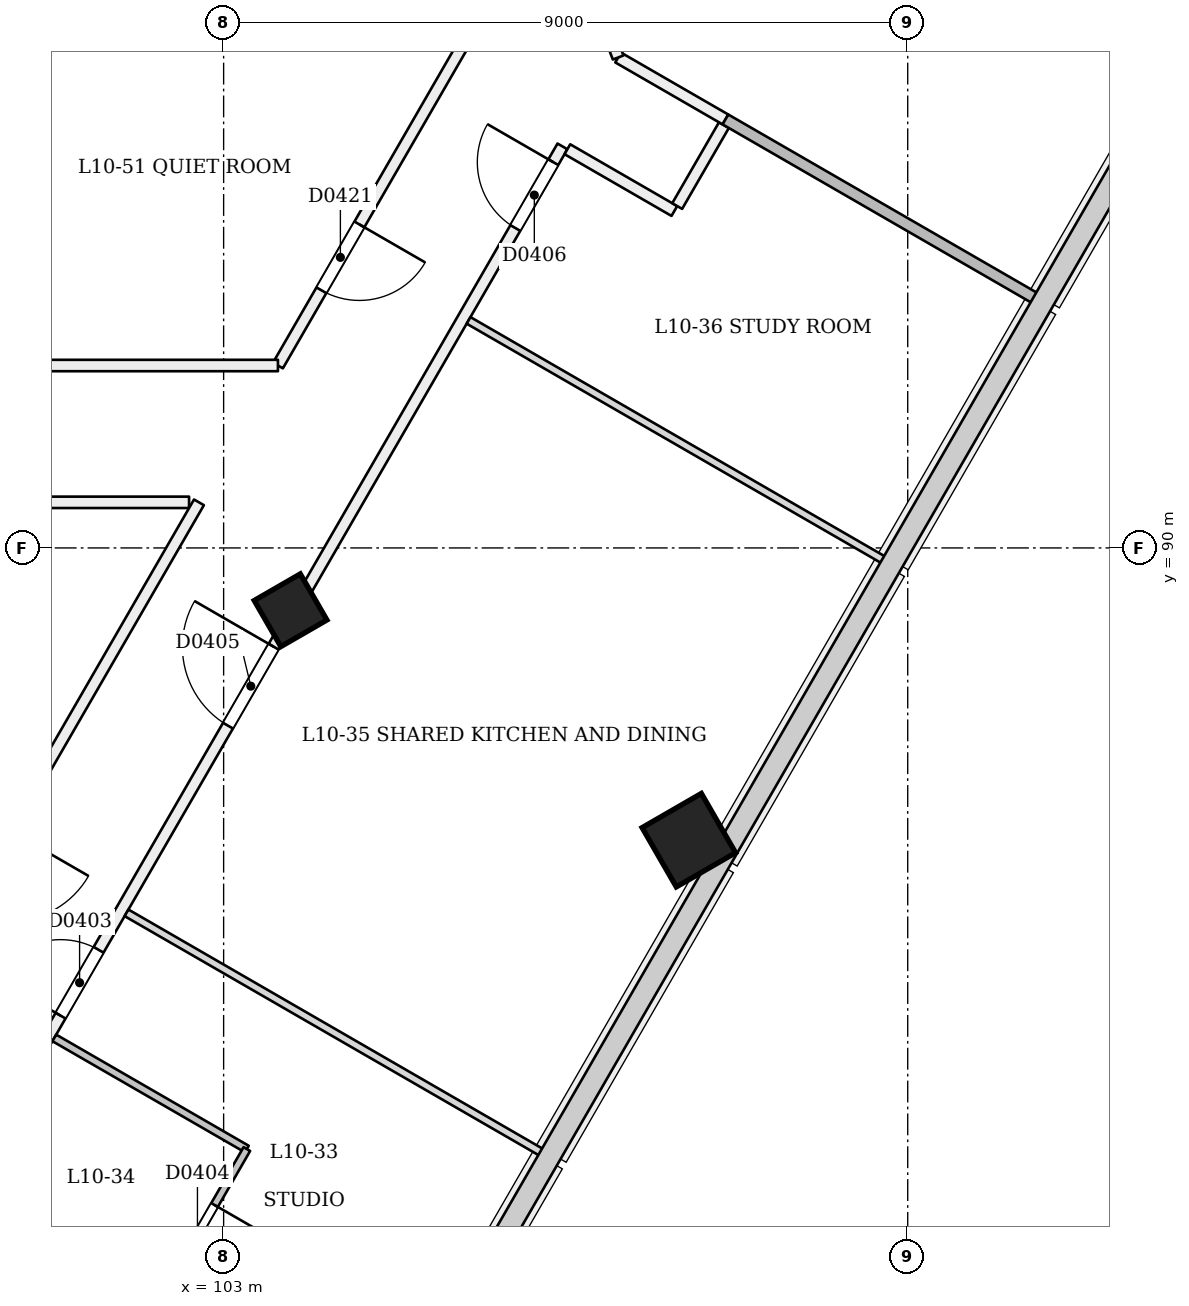
"""IFC4 building model, lengths in metres.
Left out: names, types, materials, properties, quantities, classifications, styles, units other than length and angle.
Written with IfcOpenShell. Run it as: python <this file> out.ifc"""

import sys

from ifc_helpers import new_model, si_unit, direction, frame, frame_2d, origin, origin_2d, place, context, subcontext, project, spatial, rectangle, extrude, element, fill, save


model = new_model("IFC4")
c1 = context("Model", 3, precision=1e-05, world=origin(), true_north=direction((0.0, 1.0)))
c2 = subcontext(c1, "Body", "Model", "MODEL_VIEW")
j1 = project(units=[si_unit("LENGTHUNIT", "METRE"), si_unit("PLANEANGLEUNIT", "RADIAN")], contexts=[c1])
p1 = place(None, origin())
s1 = spatial("IfcSite", under=j1, at=p1, CompositionType="ELEMENT")
p2 = place(p1, origin())
s2 = spatial("IfcBuilding", under=s1, at=p2, CompositionType="ELEMENT")
p3 = place(p2, frame((0.0, 0.0, 45.0)))
s3 = spatial("IfcBuildingStorey", under=s2, at=p3, CompositionType="ELEMENT", Elevation=45.0)
p4 = place(p3, frame((103.908, 89.133, -0.021), z_axis=(-0.022221406801, 0.038413224561, 0.999014831351), x_axis=(-0.499514905797, -0.86602108808, 0.022188598117)))
e1 = element("IfcColumn", 1, at=p4, inside=s3, PredefinedType="COLUMN", context=c2, shape_type="SweptSolid", body=[
    extrude(rectangle(XDim=0.7, YDim=0.7, at=origin_2d()), origin(), (0.0, 0.0, 1.0), 3.604),
])
p5 = place(p3, frame((109.147, 86.108, -0.027), z_axis=(-0.02222134892, 0.038480872521, 0.999012229206), x_axis=(-0.500176541907, -0.865638373249, 0.022217868592)))
e2 = element("IfcColumn", 2, at=p5, inside=s3, PredefinedType="COLUMN", context=c2, shape_type="SweptSolid", body=[
    extrude(rectangle(XDim=0.9, YDim=0.9, at=origin_2d()), origin(), (0.0, 0.0, 1.0), 3.604),
])
p6 = place(p3, frame((89.157, 63.586, 0.0), z_axis=(0.0, 0.0, 1.0), x_axis=(0.500000960059, 0.866024849493, 0.0)))
e3 = element("IfcWall", 3, at=p6, inside=s3, PredefinedType="PARTITIONING", context=c2, shape_type="SweptSolid", body=[
    extrude(rectangle(XDim=36.6, YDim=0.15, at=frame_2d((18.3, 0.0))), origin(), (0.0, 0.0, 1.0), 2.7),
])
p7 = place(p6, frame((5.395, 0.0, 0.0)))
e4 = element("IfcOpeningElement", 4, at=p7, cuts=e3, PredefinedType="OPENING", context=c2, shape_type="SweptSolid", body=[
    extrude(rectangle(XDim=1.0, YDim=2.1, at=frame_2d((0.5, 1.05))), frame((0.0, 0.085, 0.0), z_axis=(0.0, -1.0, 0.0), x_axis=(1.0, 0.0, 0.0)), (0.0, 0.0, 1.0), 0.171),
])
p8 = place(p6, frame((7.605, 0.0, 0.0)))
e5 = element("IfcOpeningElement", 5, at=p8, cuts=e3, PredefinedType="OPENING", context=c2, shape_type="SweptSolid", body=[
    extrude(rectangle(XDim=1.0, YDim=2.1, at=frame_2d((0.5, 1.05))), frame((0.0, 0.085, 0.0), z_axis=(0.0, -1.0, 0.0), x_axis=(1.0, 0.0, 0.0)), (0.0, 0.0, 1.0), 0.171),
])
p9 = place(p6, frame((13.25, 0.0, 0.0)))
e6 = element("IfcOpeningElement", 6, at=p9, cuts=e3, PredefinedType="OPENING", context=c2, shape_type="SweptSolid", body=[
    extrude(rectangle(XDim=1.0, YDim=2.1, at=frame_2d((0.5, 1.05))), frame((0.0, 0.085, 0.0), z_axis=(0.0, -1.0, 0.0), x_axis=(1.0, 0.0, 0.0)), (0.0, 0.0, 1.0), 0.171),
])
p10 = place(p6, frame((16.605, 0.0, 0.0)))
e7 = element("IfcOpeningElement", 7, at=p10, cuts=e3, PredefinedType="OPENING", context=c2, shape_type="SweptSolid", body=[
    extrude(rectangle(XDim=1.0, YDim=2.1, at=frame_2d((0.5, 1.05))), frame((0.0, 0.085, 0.0), z_axis=(0.0, -1.0, 0.0), x_axis=(1.0, 0.0, 0.0)), (0.0, 0.0, 1.0), 0.171),
])
p11 = place(p6, frame((23.395, 0.0, 0.0)))
e8 = element("IfcOpeningElement", 8, at=p11, cuts=e3, PredefinedType="OPENING", context=c2, shape_type="SweptSolid", body=[
    extrude(rectangle(XDim=1.0, YDim=2.1, at=frame_2d((0.5, 1.05))), frame((0.0, 0.085, 0.0), z_axis=(0.0, -1.0, 0.0), x_axis=(1.0, 0.0, 0.0)), (0.0, 0.0, 1.0), 0.171),
])
p12 = place(p6, frame((27.8, 0.0, 0.0)))
e9 = element("IfcOpeningElement", 9, at=p12, cuts=e3, PredefinedType="OPENING", context=c2, shape_type="SweptSolid", body=[
    extrude(rectangle(XDim=1.2, YDim=2.1, at=frame_2d((0.6, 1.05))), frame((0.0, 0.085, 0.0), z_axis=(0.0, -1.0, 0.0), x_axis=(1.0, 0.0, 0.0)), (0.0, 0.0, 1.0), 0.171),
])
p13 = place(p6, frame((35.36, 0.0, 0.0)))
e10 = element("IfcOpeningElement", 10, at=p13, cuts=e3, PredefinedType="OPENING", context=c2, shape_type="SweptSolid", body=[
    extrude(rectangle(XDim=1.0, YDim=2.1, at=frame_2d((0.5, 1.05))), frame((0.0, 0.085, 0.0), z_axis=(0.0, -1.0, 0.0), x_axis=(1.0, 0.0, 0.0)), (0.0, 0.0, 1.0), 0.171),
])
p14 = place(p3, frame((107.522, 95.245, 0.0), z_axis=(0.0, 0.0, 1.0), x_axis=(0.866015446554, -0.500017246033, 0.0)))
e11 = element("IfcWall", 11, at=p14, inside=s3, PredefinedType="PARTITIONING", context=c2, shape_type="SweptSolid", body=[
    extrude(rectangle(XDim=1.625, YDim=0.15, at=frame_2d((0.812, 0.0))), origin(), (0.0, 0.0, 1.0), 3.1),
])
p15 = place(p3, frame((108.967, 94.498, 0.0), z_axis=(0.0, 0.0, 1.0), x_axis=(0.499963176624, 0.866046662726, 0.0)))
e12 = element("IfcWall", 12, at=p15, inside=s3, PredefinedType="PARTITIONING", context=c2, shape_type="SweptSolid", body=[
    extrude(rectangle(XDim=1.229, YDim=0.15, at=frame_2d((0.615, 0.0))), origin(), (0.0, 0.0, 1.0), 3.1),
])
p16 = place(p3, frame((109.602, 95.637, 0.0), z_axis=(0.0, 0.0, 1.0), x_axis=(-0.86604092097, 0.499973122483, 0.0)))
e13 = element("IfcWall", 13, at=p16, inside=s3, PredefinedType="PARTITIONING", context=c2, shape_type="SweptSolid", body=[
    extrude(rectangle(XDim=1.63, YDim=0.15, at=frame_2d((0.815, 0.0))), origin(), (0.0, 0.0, 1.0), 3.1),
])
p17 = place(p3, frame((108.19, 96.452, 0.0), z_axis=(0.0, 0.0, 1.0), x_axis=(-0.354044281385, 0.935228660178, 0.0)))
e14 = element("IfcWall", 14, at=p17, inside=s3, PredefinedType="PARTITIONING", context=c2, shape_type="SweptSolid", body=[
    extrude(rectangle(XDim=1.062, YDim=0.15, at=frame_2d((0.531, 0.0))), origin(), (0.0, 0.0, 1.0), 3.1),
])
p18 = place(p3, frame((88.051, 90.6, 0.0), z_axis=(0.0, 0.0, 1.0), x_axis=(1.0, 0.0, 0.0)))
e15 = element("IfcWall", 15, at=p18, inside=s3, PredefinedType="PARTITIONING", context=c2, shape_type="SweptSolid", body=[
    extrude(rectangle(XDim=14.494, YDim=0.15, at=frame_2d((7.247, 0.0))), origin(), (0.0, 0.0, 1.0), 3.1),
])
p19 = place(p18, frame((1.483, 0.0, 0.0)))
e16 = element("IfcOpeningElement", 16, at=p19, cuts=e15, PredefinedType="OPENING", context=c2, shape_type="SweptSolid", body=[
    extrude(rectangle(XDim=1.2, YDim=2.1, at=frame_2d((0.6, 1.05))), frame((0.0, 0.085, 0.0), z_axis=(0.0, -1.0, 0.0), x_axis=(1.0, 0.0, 0.0)), (0.0, 0.0, 1.0), 0.171),
])
p20 = place(p3, frame((102.675, 90.6, 0.0), z_axis=(0.0, 0.0, 1.0), x_axis=(-0.499997865474, -0.86602663615, 0.0)))
e17 = element("IfcWall", 17, at=p20, inside=s3, PredefinedType="PARTITIONING", context=c2, shape_type="SweptSolid", body=[
    extrude(rectangle(XDim=35.221, YDim=0.15, at=frame_2d((17.61, 0.0))), origin(), (0.0, 0.0, 1.0), 3.1),
])
p21 = place(p20, frame((12.875, 0.0, 0.0)))
e18 = element("IfcOpeningElement", 18, at=p21, cuts=e17, PredefinedType="OPENING", context=c2, shape_type="SweptSolid", body=[
    extrude(rectangle(XDim=1.2, YDim=2.1, at=frame_2d((0.6, 1.05))), frame((0.0, 0.085, 0.0), z_axis=(0.0, -1.0, 0.0), x_axis=(1.0, 0.0, 0.0)), (0.0, 0.0, 1.0), 0.171),
])
p22 = place(p20, frame((4.983, 0.0, 0.0)))
e19 = element("IfcOpeningElement", 19, at=p22, cuts=e17, PredefinedType="OPENING", context=c2, shape_type="SweptSolid", body=[
    extrude(rectangle(XDim=1.2, YDim=2.1, at=frame_2d((0.6, 1.05))), frame((0.0, 0.085, 0.0), z_axis=(0.0, -1.0, 0.0), x_axis=(1.0, 0.0, 0.0)), (0.0, 0.0, 1.0), 0.171),
])
p23 = place(p20, frame((21.048, 0.0, 0.0)))
e20 = element("IfcOpeningElement", 20, at=p23, cuts=e17, PredefinedType="OPENING", context=c2, shape_type="SweptSolid", body=[
    extrude(rectangle(XDim=1.0, YDim=2.1, at=frame_2d((0.5, 1.05))), frame((0.0, 0.085, 0.0), z_axis=(0.0, -1.0, 0.0), x_axis=(1.0, 0.0, 0.0)), (0.0, 0.0, 1.0), 0.171),
])
p24 = place(p3, frame((106.182, 96.673, 0.0), z_axis=(0.0, 0.0, 1.0), x_axis=(-0.499986575203, -0.866033154456, 0.0)))
e21 = element("IfcWall", 21, at=p24, inside=s3, PredefinedType="PARTITIONING", context=c2, shape_type="SweptSolid", body=[
    extrude(rectangle(XDim=4.934, YDim=0.15, at=frame_2d((2.467, 0.0))), origin(), (0.0, 0.0, 1.0), 3.1),
])
p25 = place(p24, frame((2.791, 0.0, 0.0)))
e22 = element("IfcOpeningElement", 22, at=p25, cuts=e21, PredefinedType="OPENING", context=c2, shape_type="SweptSolid", body=[
    extrude(rectangle(XDim=1.0, YDim=2.1, at=frame_2d((0.5, 1.05))), frame((0.0, 0.085, 0.0), z_axis=(0.0, -1.0, 0.0), x_axis=(1.0, 0.0, 0.0)), (0.0, 0.0, 1.0), 0.171),
])
p26 = place(p3, frame((103.715, 92.4, 0.0), z_axis=(0.0, 0.0, 1.0), x_axis=(-1.0, 0.0, 0.0)))
e23 = element("IfcWall", 23, at=p26, inside=s3, PredefinedType="PARTITIONING", context=c2, shape_type="SweptSolid", body=[
    extrude(rectangle(XDim=3.84, YDim=0.15, at=frame_2d((1.92, 0.0))), origin(), (0.0, 0.0, 1.0), 3.1),
])
p27 = place(p3, frame((101.962, 79.865, 0.0), z_axis=(0.0, 0.0, 1.0), x_axis=(-0.866018712932, 0.500011588718, 0.0)))
e24 = element("IfcWall", 24, at=p27, inside=s3, PredefinedType="PARTITIONING", context=c2, shape_type="SweptSolid", body=[
    extrude(rectangle(XDim=2.875, YDim=0.1, at=frame_2d((1.438, 0.0))), origin(), (0.0, 0.0, 1.0), 2.7),
])
p28 = place(p3, frame((100.772, 83.554, 0.0), z_axis=(0.0, 0.0, 1.0), x_axis=(0.866025730634, -0.499999433879, 0.0)))
e25 = element("IfcWall", 25, at=p28, inside=s3, PredefinedType="PARTITIONING", context=c2, shape_type="SweptSolid", body=[
    extrude(rectangle(XDim=2.925, YDim=0.1, at=frame_2d((1.462, 0.0))), origin(), (0.0, 0.0, 1.0), 3.1),
])
p29 = place(p3, frame((103.305, 82.092, 0.0), z_axis=(0.0, 0.0, 1.0), x_axis=(-0.499971721724, -0.866041729639, 0.0)))
e26 = element("IfcWall", 26, at=p29, inside=s3, PredefinedType="PARTITIONING", context=c2, shape_type="SweptSolid", body=[
    extrude(rectangle(XDim=5.2, YDim=0.1, at=frame_2d((2.6, 0.0))), origin(), (0.0, 0.0, 1.0), 2.7),
])
p30 = place(p29, frame((3.45, 0.0, 0.0)))
e27 = element("IfcOpeningElement", 27, at=p30, cuts=e26, PredefinedType="OPENING", context=c2, shape_type="SweptSolid", body=[
    extrude(rectangle(XDim=0.9, YDim=2.1, at=frame_2d((0.45, 1.05))), frame((0.0, 0.061, 0.0), z_axis=(0.0, -1.0, 0.0), x_axis=(1.0, 0.0, 0.0)), (0.0, 0.0, 1.0), 0.121),
])
p31 = place(p29, frame((0.85, 0.0, 0.0)))
e28 = element("IfcOpeningElement", 28, at=p31, cuts=e26, PredefinedType="OPENING", context=c2, shape_type="SweptSolid", body=[
    extrude(rectangle(XDim=0.9, YDim=2.1, at=frame_2d((0.45, 1.05))), frame((0.0, 0.061, 0.0), z_axis=(0.0, -1.0, 0.0), x_axis=(1.0, 0.0, 0.0)), (0.0, 0.0, 1.0), 0.121),
])
for number, where, z_axis, x_axis in (
    (29, (107.218, 82.027, 0.0), (0.0, 0.0, 1.0), (-0.866, 0.5, 0.0)),
    (30, (111.718, 89.821, 0.0), (0.0, 0.0, 1.0), (-0.866, 0.5, 0.0)),
):
    element("IfcWall", number, at=place(p3, frame(where, z_axis=z_axis, x_axis=x_axis)), inside=s3, PredefinedType="PARTITIONING", context=c2, shape_type="SweptSolid", body=[
        extrude(rectangle(XDim=6.345, YDim=0.1, at=frame_2d((3.173, 0.0))), origin(), (0.0, 0.0, 1.0), 2.6),
    ])
p32 = place(p3, frame((113.707, 93.267, 0.0), z_axis=(0.0, 0.0, 1.0), x_axis=(-0.866028632512, 0.499994407638, 0.0)))
e31 = element("IfcWall", 31, at=p32, inside=s3, PredefinedType="PARTITIONING", context=c2, shape_type="SweptSolid", body=[
    extrude(rectangle(XDim=4.74, YDim=0.15, at=frame_2d((2.37, 0.0))), origin(), (0.0, 0.0, 1.0), 2.6),
])
p33 = place(p11, origin())
e32 = element("IfcDoor", 32, at=p33, inside=s3, OperationType="SINGLE_SWING_LEFT", PredefinedType="NOTDEFINED", context=c2, shape_type="SweptSolid", body=[
    extrude(rectangle(XDim=1.0, YDim=2.1, at=frame_2d((0.5, 1.05))), frame((0.0, 0.025, 0.0), z_axis=(0.0, -1.0, 0.0), x_axis=(1.0, 0.0, 0.0)), (0.0, 0.0, 1.0), 0.05),
])
fill(e8, e32)
p34 = place(p31, origin())
e33 = element("IfcDoor", 33, at=p34, inside=s3, OperationType="SINGLE_SWING_LEFT", PredefinedType="NOTDEFINED", context=c2, shape_type="SweptSolid", body=[
    extrude(rectangle(XDim=0.9, YDim=2.1, at=frame_2d((0.45, 1.05))), frame((0.0, 0.025, 0.0), z_axis=(0.0, -1.0, 0.0), x_axis=(1.0, 0.0, 0.0)), (0.0, 0.0, 1.0), 0.05),
])
fill(e28, e33)
p35 = place(p12, origin())
e34 = element("IfcDoor", 34, at=p35, inside=s3, OperationType="SINGLE_SWING_RIGHT", PredefinedType="NOTDEFINED", context=c2, shape_type="SweptSolid", body=[
    extrude(rectangle(XDim=1.2, YDim=2.1, at=frame_2d((0.6, 1.05))), frame((0.0, 0.025, 0.0), z_axis=(0.0, -1.0, 0.0), x_axis=(1.0, 0.0, 0.0)), (0.0, 0.0, 1.0), 0.05),
])
fill(e9, e34)
p36 = place(p13, origin())
e35 = element("IfcDoor", 35, at=p36, inside=s3, OperationType="SINGLE_SWING_RIGHT", PredefinedType="NOTDEFINED", context=c2, shape_type="SweptSolid", body=[
    extrude(rectangle(XDim=1.0, YDim=2.1, at=frame_2d((0.5, 1.05))), frame((0.0, 0.025, 0.0), z_axis=(0.0, -1.0, 0.0), x_axis=(1.0, 0.0, 0.0)), (0.0, 0.0, 1.0), 0.05),
])
fill(e10, e35)
p37 = place(p25, origin())
e36 = element("IfcDoor", 36, at=p37, inside=s3, OperationType="SINGLE_SWING_LEFT", PredefinedType="NOTDEFINED", context=c2, shape_type="SweptSolid", body=[
    extrude(rectangle(XDim=1.0, YDim=2.1, at=frame_2d((0.5, 1.05))), frame((0.0, 0.025, 0.0), z_axis=(0.0, -1.0, 0.0), x_axis=(1.0, 0.0, 0.0)), (0.0, 0.0, 1.0), 0.05),
])
fill(e22, e36)
save(model, sys.argv[1])
